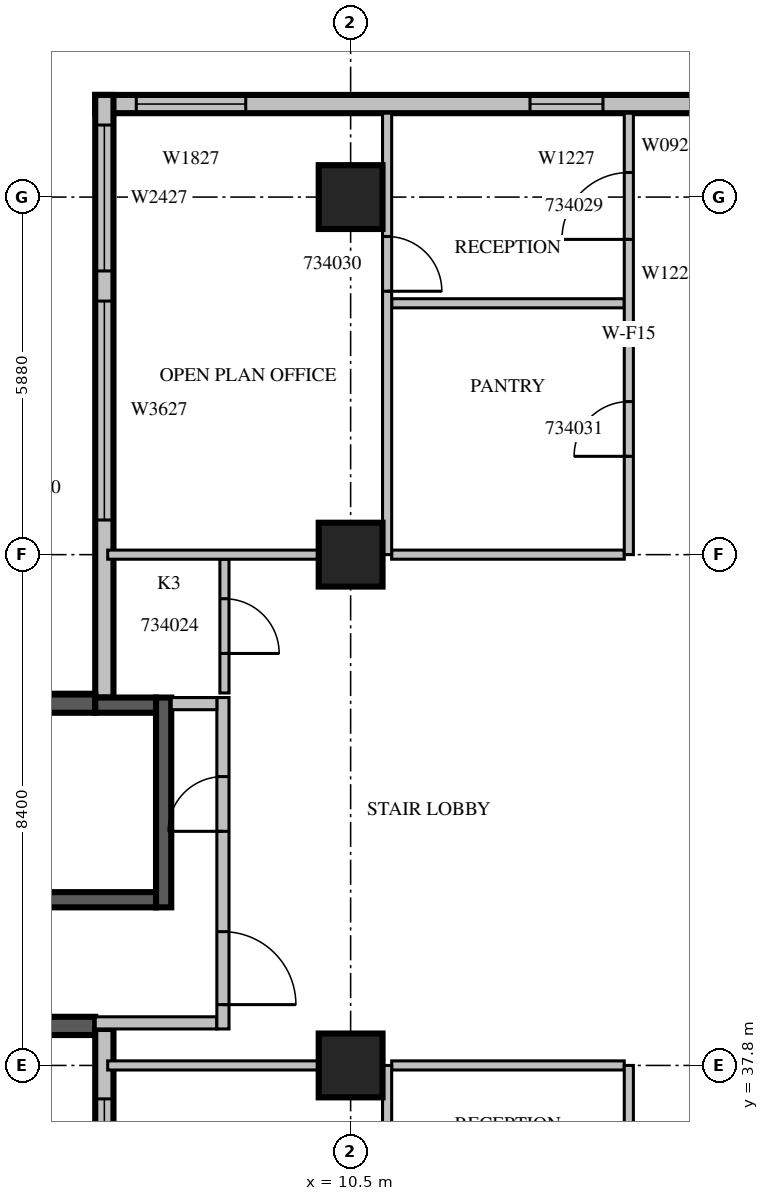
"""IFC4 building model, lengths in metres.
Left out: names, types, materials, properties, quantities, classifications, styles, units other than length and angle.
Written with IfcOpenShell. Run it as: python <this file> out.ifc"""

import sys

from ifc_helpers import new_model, si_unit, direction, frame, frame_2d, origin, origin_2d, place, context, subcontext, project, spatial, rectangle, extrude, source, transform, mapped, element, fill, save


model = new_model("IFC4")
c1 = context("Model", 3, precision=1e-05, world=origin(), true_north=direction((0.0, 1.0)))
c2 = subcontext(c1, "Body", "Model", "MODEL_VIEW")
j1 = project(units=[si_unit("LENGTHUNIT", "METRE"), si_unit("PLANEANGLEUNIT", "RADIAN")], contexts=[c1])
p1 = place(None, origin())
s1 = spatial("IfcSite", under=j1, at=p1, CompositionType="ELEMENT")
p2 = place(p1, origin())
s2 = spatial("IfcBuilding", under=s1, at=p2, CompositionType="ELEMENT")
p3 = place(p2, frame((0.0, 0.0, 153.9)))
s3 = spatial("IfcBuildingStorey", under=s2, at=p3, CompositionType="ELEMENT", Elevation=153.9)
m1 = source(origin(), c2, "Body", "SweptSolid", [
    extrude(rectangle(XDim=1.05, YDim=1.05, at=origin_2d()), origin(), (0.0, 0.0, 1.0), 4.2),
])
for number, where, z_axis, x_axis in (
    (1, (10.5, 37.8, 0.0), (0.0, 0.0, 1.0), (1.0, 0.0, 0.0)),
    (2, (10.5, 46.2, 0.0), (0.0, 0.0, 1.0), (1.0, 0.0, 0.0)),
    (3, (10.5, 52.08, 0.0), (0.0, 0.0, 1.0), (1.0, 0.0, 0.0)),
):
    element("IfcColumn", number, at=place(p3, frame(where, z_axis=z_axis, x_axis=x_axis)), inside=s3, PredefinedType="COLUMN", context=c2, shape_type="MappedRepresentation", body=[
        mapped(m1, transform((0.0, 0.0, 0.0), scale=1.0)),
    ])
m2 = source(origin(), c2, "Body", "SweptSolid", [
    extrude(rectangle(XDim=10.5, YDim=0.3, at=frame_2d((5.25, 0.0))), origin(), (0.0, 0.0, 1.0), 3.8),
])
p4 = place(p3, frame((16.8, 53.61, 0.0), z_axis=(0.0, 0.0, 1.0), x_axis=(-1.0, 0.0, 0.0)))
e4 = element("IfcWall", 4, at=p4, inside=s3, PredefinedType="STANDARD", context=c2, shape_type="MappedRepresentation", body=[
    mapped(m2, transform((0.0, 0.0, 0.0), scale=1.0)),
])
m3 = source(origin(), c2, "Body", "SweptSolid", [
    extrude(rectangle(XDim=1.2, YDim=2.7, at=frame_2d((0.6, 1.35))), frame((0.0, 0.16, 0.0), z_axis=(0.0, -1.0, 0.0), x_axis=(1.0, 0.0, 0.0)), (0.0, 0.0, 1.0), 0.32),
])
p5 = place(p4, frame((2.15, 0.0, 0.6)))
e5 = element("IfcOpeningElement", 5, at=p5, cuts=e4, PredefinedType="OPENING", context=c2, shape_type="MappedRepresentation", body=[
    mapped(m3, transform((0.0, 0.0, 0.0), scale=1.0)),
])
m4 = source(origin(), c2, "Body", "SweptSolid", [
    extrude(rectangle(XDim=1.8, YDim=2.7, at=frame_2d((0.9, 1.35))), frame((0.0, 0.16, 0.0), z_axis=(0.0, -1.0, 0.0), x_axis=(1.0, 0.0, 0.0)), (0.0, 0.0, 1.0), 0.32),
])
p6 = place(p4, frame((8.025, 0.0, 0.6)))
e6 = element("IfcOpeningElement", 6, at=p6, cuts=e4, PredefinedType="OPENING", context=c2, shape_type="MappedRepresentation", body=[
    mapped(m4, transform((0.0, 0.0, 0.0), scale=1.0)),
])
m5 = source(origin(), c2, "Body", "SweptSolid", [
    extrude(rectangle(XDim=9.91, YDim=0.3, at=frame_2d((4.955, 0.0))), origin(), (0.0, 0.0, 1.0), 3.8),
])
p7 = place(p3, frame((6.45, 53.76, 0.0), z_axis=(0.0, 0.0, 1.0), x_axis=(0.0, -1.0, 0.0)))
e7 = element("IfcWall", 7, at=p7, inside=s3, PredefinedType="STANDARD", context=c2, shape_type="MappedRepresentation", body=[
    mapped(m5, transform((0.0, 0.0, 0.0), scale=1.0)),
])
m6 = source(origin(), c2, "Body", "SweptSolid", [
    extrude(rectangle(XDim=3.6, YDim=2.7, at=frame_2d((1.8, 1.35))), frame((0.0, 0.16, 0.0), z_axis=(0.0, -1.0, 0.0), x_axis=(1.0, 0.0, 0.0)), (0.0, 0.0, 1.0), 0.32),
])
p8 = place(p7, frame((3.39, 0.0, 0.6)))
e8 = element("IfcOpeningElement", 8, at=p8, cuts=e7, PredefinedType="OPENING", context=c2, shape_type="MappedRepresentation", body=[
    mapped(m6, transform((0.0, 0.0, 0.0), scale=1.0)),
])
m7 = source(origin(), c2, "Body", "SweptSolid", [
    extrude(rectangle(XDim=2.4, YDim=2.7, at=frame_2d((1.2, 1.35))), frame((0.0, 0.16, 0.0), z_axis=(0.0, -1.0, 0.0), x_axis=(1.0, 0.0, 0.0)), (0.0, 0.0, 1.0), 0.32),
])
p9 = place(p7, frame((0.495, 0.0, 0.6)))
e9 = element("IfcOpeningElement", 9, at=p9, cuts=e7, PredefinedType="OPENING", context=c2, shape_type="MappedRepresentation", body=[
    mapped(m7, transform((0.0, 0.0, 0.0), scale=1.0)),
])
m8 = source(origin(), c2, "Body", "SweptSolid", [
    extrude(rectangle(XDim=6.1, YDim=0.3, at=frame_2d((3.05, 0.0))), origin(), (0.0, 0.0, 1.0), 3.8),
])
for number, where, z_axis, x_axis in (
    (10, (6.3, 43.75, 0.0), (0.0, 0.0, 1.0), (-1.0, 0.0, 0.0)),
    (11, (0.2, 38.45, 0.0), (0.0, 0.0, 1.0), (1.0, 0.0, 0.0)),
):
    element("IfcWall", number, at=place(p3, frame(where, z_axis=z_axis, x_axis=x_axis)), inside=s3, PredefinedType="SOLIDWALL", context=c2, shape_type="MappedRepresentation", body=[
        mapped(m8, transform((0.0, 0.0, 0.0), scale=1.0)),
    ])
m9 = source(origin(), c2, "Body", "SweptSolid", [
    extrude(rectangle(XDim=16.4, YDim=0.3, at=frame_2d((8.2, 0.0))), origin(), (0.0, 0.0, 1.0), 3.8),
])
p10 = place(p3, frame((6.45, 38.4, 0.0), z_axis=(0.0, 0.0, 1.0), x_axis=(0.0, -1.0, 0.0)))
e12 = element("IfcWall", 12, at=p10, inside=s3, PredefinedType="STANDARD", context=c2, shape_type="MappedRepresentation", body=[
    mapped(m9, transform((0.0, 0.0, 0.0), scale=1.0)),
])
p11 = place(p10, frame((1.15, 0.0, 0.6)))
e13 = element("IfcOpeningElement", 13, at=p11, cuts=e12, PredefinedType="OPENING", context=c2, shape_type="MappedRepresentation", body=[
    mapped(m4, transform((0.0, 0.0, 0.0), scale=1.0)),
])
p12 = place(p10, frame((4.75, 0.0, 0.6)))
e14 = element("IfcOpeningElement", 14, at=p12, cuts=e12, PredefinedType="OPENING", context=c2, shape_type="MappedRepresentation", body=[
    mapped(m7, transform((0.0, 0.0, 0.0), scale=1.0)),
])
p13 = place(p10, frame((12.912, 0.0, 0.6)))
e15 = element("IfcOpeningElement", 15, at=p13, cuts=e12, PredefinedType="OPENING", context=c2, shape_type="MappedRepresentation", body=[
    mapped(m3, transform((0.0, 0.0, 0.0), scale=1.0)),
])
m10 = source(origin(), c2, "Body", "SweptSolid", [
    extrude(rectangle(XDim=1.0, YDim=2.1, at=frame_2d((0.5, 1.05))), frame((0.0, 0.16, 0.0), z_axis=(0.0, -1.0, 0.0), x_axis=(1.0, 0.0, 0.0)), (0.0, 0.0, 1.0), 0.32),
])
p14 = place(p10, frame((10.142, 0.0, 0.0)))
e16 = element("IfcOpeningElement", 16, at=p14, cuts=e12, PredefinedType="OPENING", context=c2, shape_type="MappedRepresentation", body=[
    mapped(m10, transform((0.0, 0.0, 0.0), scale=1.0)),
])
m11 = source(origin(), c2, "Body", "SweptSolid", [
    extrude(rectangle(XDim=7.0, YDim=0.25, at=frame_2d((3.5, 0.0))), origin(), (0.0, 0.0, 1.0), 3.8),
])
p15 = place(p3, frame((0.3, 40.525, 0.0), z_axis=(0.0, 0.0, 1.0), x_axis=(1.0, 0.0, 0.0)))
e17 = element("IfcWall", 17, at=p15, inside=s3, PredefinedType="SOLIDWALL", context=c2, shape_type="MappedRepresentation", body=[
    mapped(m11, transform((0.0, 0.0, 0.0), scale=1.0)),
])
m12 = source(origin(), c2, "Body", "SweptSolid", [
    extrude(rectangle(XDim=1.1, YDim=2.1, at=frame_2d((0.55, 1.05))), frame((0.0, 0.135, 0.0), z_axis=(0.0, -1.0, 0.0), x_axis=(1.0, 0.0, 0.0)), (0.0, 0.0, 1.0), 0.27),
])
p16 = place(p15, frame((0.55, 0.0, 0.0)))
e18 = element("IfcOpeningElement", 18, at=p16, cuts=e17, PredefinedType="OPENING", context=c2, shape_type="MappedRepresentation", body=[
    mapped(m12, transform((0.0, 0.0, 0.0), scale=1.0)),
])
m13 = source(origin(), c2, "Body", "SweptSolid", [
    extrude(rectangle(XDim=1.0, YDim=0.25, at=frame_2d((0.5, 0.0))), origin(), (0.0, 0.0, 1.0), 3.8),
])
p17 = place(p3, frame((6.3, 43.725, 0.0), z_axis=(0.0, 0.0, 1.0), x_axis=(1.0, 0.0, 0.0)))
e19 = element("IfcWall", 19, at=p17, inside=s3, PredefinedType="SOLIDWALL", context=c2, shape_type="MappedRepresentation", body=[
    mapped(m13, transform((0.0, 0.0, 0.0), scale=1.0)),
])
m14 = source(origin(), c2, "Body", "SweptSolid", [
    extrude(rectangle(XDim=3.45, YDim=0.25, at=frame_2d((1.725, 0.0))), origin(), (0.0, 0.0, 1.0), 3.8),
])
p18 = place(p3, frame((7.425, 40.4, 0.0), z_axis=(0.0, 0.0, 1.0), x_axis=(0.0, 1.0, 0.0)))
e20 = element("IfcWall", 20, at=p18, inside=s3, PredefinedType="SOLIDWALL", context=c2, shape_type="MappedRepresentation", body=[
    mapped(m14, transform((0.0, 0.0, 0.0), scale=1.0)),
])
m15 = source(origin(), c2, "Body", "SweptSolid", [
    extrude(rectangle(XDim=2.0, YDim=0.2, at=frame_2d((1.0, 0.0))), origin(), (0.0, 0.0, 1.0), 3.8),
])
p19 = place(p3, frame((6.3, 38.5, 0.0), z_axis=(0.0, 0.0, 1.0), x_axis=(1.0, 0.0, 0.0)))
e21 = element("IfcWall", 21, at=p19, inside=s3, PredefinedType="PARTITIONING", context=c2, shape_type="MappedRepresentation", body=[
    mapped(m15, transform((0.0, 0.0, 0.0), scale=1.0)),
])
m16 = source(origin(), c2, "Body", "SweptSolid", [
    extrude(rectangle(XDim=5.45, YDim=0.2, at=frame_2d((2.725, 0.0))), origin(), (0.0, 0.0, 1.0), 3.8),
])
p20 = place(p3, frame((8.4, 38.4, 0.0), z_axis=(0.0, 0.0, 1.0), x_axis=(0.0, 1.0, 0.0)))
e22 = element("IfcWall", 22, at=p20, inside=s3, PredefinedType="PARTITIONING", context=c2, shape_type="MappedRepresentation", body=[
    mapped(m16, transform((0.0, 0.0, 0.0), scale=1.0)),
])
m17 = source(origin(), c2, "Body", "SweptSolid", [
    extrude(rectangle(XDim=1.2, YDim=2.1, at=frame_2d((0.6, 1.05))), frame((0.0, 0.11, 0.0), z_axis=(0.0, -1.0, 0.0), x_axis=(1.0, 0.0, 0.0)), (0.0, 0.0, 1.0), 0.22),
])
p21 = place(p20, frame((0.4, 0.0, 0.0)))
e23 = element("IfcOpeningElement", 23, at=p21, cuts=e22, PredefinedType="OPENING", context=c2, shape_type="MappedRepresentation", body=[
    mapped(m17, transform((0.0, 0.0, 0.0), scale=1.0)),
])
m18 = source(origin(), c2, "Body", "SweptSolid", [
    extrude(rectangle(XDim=0.9, YDim=2.1, at=frame_2d((0.45, 1.05))), frame((0.0, 0.11, 0.0), z_axis=(0.0, -1.0, 0.0), x_axis=(1.0, 0.0, 0.0)), (0.0, 0.0, 1.0), 0.22),
])
p22 = place(p20, frame((3.25, 0.0, 0.0)))
e24 = element("IfcOpeningElement", 24, at=p22, cuts=e22, PredefinedType="OPENING", context=c2, shape_type="MappedRepresentation", body=[
    mapped(m18, transform((0.0, 0.0, 0.0), scale=1.0)),
])
m19 = source(origin(), c2, "Body", "SweptSolid", [
    extrude(rectangle(XDim=0.75, YDim=0.2, at=frame_2d((0.375, 0.0))), origin(), (0.0, 0.0, 1.0), 3.8),
])
p23 = place(p3, frame((7.55, 43.75, 0.0), z_axis=(0.0, 0.0, 1.0), x_axis=(1.0, 0.0, 0.0)))
e25 = element("IfcWall", 25, at=p23, inside=s3, PredefinedType="PARTITIONING", context=c2, shape_type="MappedRepresentation", body=[
    mapped(m19, transform((0.0, 0.0, 0.0), scale=1.0)),
])
m20 = source(origin(), c2, "Body", "SweptSolid", [
    extrude(rectangle(XDim=2.2, YDim=0.15, at=frame_2d((1.1, 0.0))), origin(), (0.0, 0.0, 1.0), 3.8),
])
p24 = place(p3, frame((8.425, 43.925, 0.0), z_axis=(0.0, 0.0, 1.0), x_axis=(0.0, 1.0, 0.0)))
e26 = element("IfcWall", 26, at=p24, inside=s3, PredefinedType="PARTITIONING", context=c2, shape_type="MappedRepresentation", body=[
    mapped(m20, transform((0.0, 0.0, 0.0), scale=1.0)),
])
m21 = source(origin(), c2, "Body", "SweptSolid", [
    extrude(rectangle(XDim=0.9, YDim=2.1, at=frame_2d((0.45, 1.05))), frame((0.0, 0.085, 0.0), z_axis=(0.0, -1.0, 0.0), x_axis=(1.0, 0.0, 0.0)), (0.0, 0.0, 1.0), 0.17),
])
p25 = place(p24, frame((0.65, 0.0, 0.0)))
e27 = element("IfcOpeningElement", 27, at=p25, cuts=e26, PredefinedType="OPENING", context=c2, shape_type="MappedRepresentation", body=[
    mapped(m21, transform((0.0, 0.0, 0.0), scale=1.0)),
])
m22 = source(origin(), c2, "Body", "SweptSolid", [
    extrude(rectangle(XDim=3.471, YDim=0.15, at=frame_2d((1.736, 0.0))), origin(), (0.0, 0.0, 1.0), 3.8),
])
p26 = place(p3, frame((9.976, 37.8, 0.0), z_axis=(0.0, 0.0, 1.0), x_axis=(-1.0, 0.0, 0.0)))
e28 = element("IfcWall", 28, at=p26, inside=s3, PredefinedType="PARTITIONING", context=c2, shape_type="MappedRepresentation", body=[
    mapped(m22, transform((0.0, 0.0, 0.0), scale=1.0)),
])
m23 = source(origin(), c2, "Body", "SweptSolid", [
    extrude(rectangle(XDim=3.825, YDim=0.15, at=frame_2d((1.913, 0.0))), origin(), (0.0, 0.0, 1.0), 3.8),
])
p27 = place(p3, frame((15.0, 37.8, 0.0), z_axis=(0.0, 0.0, 1.0), x_axis=(-1.0, 0.0, 0.0)))
e29 = element("IfcWall", 29, at=p27, inside=s3, PredefinedType="PARTITIONING", context=c2, shape_type="MappedRepresentation", body=[
    mapped(m23, transform((0.0, 0.0, 0.0), scale=1.0)),
])
m24 = source(origin(), c2, "Body", "SweptSolid", [
    extrude(rectangle(XDim=8.4, YDim=0.15, at=frame_2d((4.2, 0.0))), origin(), (0.0, 0.0, 1.0), 3.8),
])
p28 = place(p3, frame((11.1, 29.4, 0.0), z_axis=(0.0, 0.0, 1.0), x_axis=(0.0, 1.0, 0.0)))
e30 = element("IfcWall", 30, at=p28, inside=s3, PredefinedType="PARTITIONING", context=c2, shape_type="MappedRepresentation", body=[
    mapped(m24, transform((0.0, 0.0, 0.0), scale=1.0)),
])
m25 = source(origin(), c2, "Body", "SweptSolid", [
    extrude(rectangle(XDim=1.1, YDim=2.1, at=frame_2d((0.55, 1.05))), frame((0.0, 0.085, 0.0), z_axis=(0.0, -1.0, 0.0), x_axis=(1.0, 0.0, 0.0)), (0.0, 0.0, 1.0), 0.17),
])
p29 = place(p28, frame((5.955, 0.0, 0.0)))
e31 = element("IfcOpeningElement", 31, at=p29, cuts=e30, PredefinedType="OPENING", context=c2, shape_type="MappedRepresentation", body=[
    mapped(m25, transform((0.0, 0.0, 0.0), scale=1.0)),
])
p30 = place(p3, frame((15.0, 50.334, 0.0), z_axis=(0.0, 0.0, 1.0), x_axis=(-1.0, 0.0, 0.0)))
e32 = element("IfcWall", 32, at=p30, inside=s3, PredefinedType="PARTITIONING", context=c2, shape_type="MappedRepresentation", body=[
    mapped(m23, transform((0.0, 0.0, 0.0), scale=1.0)),
])
p31 = place(p3, frame((9.976, 46.2, 0.0), z_axis=(0.0, 0.0, 1.0), x_axis=(-1.0, 0.0, 0.0)))
e33 = element("IfcWall", 33, at=p31, inside=s3, PredefinedType="PARTITIONING", context=c2, shape_type="MappedRepresentation", body=[
    mapped(m22, transform((0.0, 0.0, 0.0), scale=1.0)),
])
p32 = place(p3, frame((15.0, 46.2, 0.0), z_axis=(0.0, 0.0, 1.0), x_axis=(-1.0, 0.0, 0.0)))
e34 = element("IfcWall", 34, at=p32, inside=s3, PredefinedType="PARTITIONING", context=c2, shape_type="MappedRepresentation", body=[
    mapped(m23, transform((0.0, 0.0, 0.0), scale=1.0)),
])
m26 = source(origin(), c2, "Body", "SweptSolid", [
    extrude(rectangle(XDim=7.26, YDim=0.15, at=frame_2d((3.63, 0.0))), origin(), (0.0, 0.0, 1.0), 3.8),
])
p33 = place(p3, frame((11.1, 46.2, 0.0), z_axis=(0.0, 0.0, 1.0), x_axis=(0.0, 1.0, 0.0)))
e35 = element("IfcWall", 35, at=p33, inside=s3, PredefinedType="PARTITIONING", context=c2, shape_type="MappedRepresentation", body=[
    mapped(m26, transform((0.0, 0.0, 0.0), scale=1.0)),
])
p34 = place(p33, frame((4.332, 0.0, 0.0)))
e36 = element("IfcOpeningElement", 36, at=p34, cuts=e35, PredefinedType="OPENING", context=c2, shape_type="MappedRepresentation", body=[
    mapped(m21, transform((0.0, 0.0, 0.0), scale=1.0)),
])
p35 = place(p3, frame((15.075, 29.4, 0.0), z_axis=(0.0, 0.0, 1.0), x_axis=(0.0, 1.0, 0.0)))
e37 = element("IfcWall", 37, at=p35, inside=s3, PredefinedType="PARTITIONING", context=c2, shape_type="MappedRepresentation", body=[
    mapped(m24, transform((0.0, 0.0, 0.0), scale=1.0)),
])
p36 = place(p35, frame((6.18, 0.0, 0.0)))
e38 = element("IfcOpeningElement", 38, at=p36, cuts=e37, PredefinedType="OPENING", context=c2, shape_type="MappedRepresentation", body=[
    mapped(m25, transform((0.0, 0.0, 0.0), scale=1.0)),
])
p37 = place(p35, frame((0.756, 0.0, 0.0)))
e39 = element("IfcOpeningElement", 39, at=p37, cuts=e37, PredefinedType="OPENING", context=c2, shape_type="MappedRepresentation", body=[
    mapped(m21, transform((0.0, 0.0, 0.0), scale=1.0)),
])
p38 = place(p35, frame((3.286, 0.0, 0.0)))
e40 = element("IfcOpeningElement", 40, at=p38, cuts=e37, PredefinedType="OPENING", context=c2, shape_type="MappedRepresentation", body=[
    mapped(m21, transform((0.0, 0.0, 0.0), scale=1.0)),
])
p39 = place(p3, frame((15.075, 46.2, 0.0), z_axis=(0.0, 0.0, 1.0), x_axis=(0.0, 1.0, 0.0)))
e41 = element("IfcWall", 41, at=p39, inside=s3, PredefinedType="PARTITIONING", context=c2, shape_type="MappedRepresentation", body=[
    mapped(m26, transform((0.0, 0.0, 0.0), scale=1.0)),
])
p40 = place(p39, frame((5.184, 0.0, 0.0)))
e42 = element("IfcOpeningElement", 42, at=p40, cuts=e41, PredefinedType="OPENING", context=c2, shape_type="MappedRepresentation", body=[
    mapped(m25, transform((0.0, 0.0, 0.0), scale=1.0)),
])
p41 = place(p39, frame((1.617, 0.0, 0.0)))
e43 = element("IfcOpeningElement", 43, at=p41, cuts=e41, PredefinedType="OPENING", context=c2, shape_type="MappedRepresentation", body=[
    mapped(m21, transform((0.0, 0.0, 0.0), scale=1.0)),
])
m27 = source(origin(), c2, "Body", "SweptSolid", [
    extrude(rectangle(XDim=1.2, YDim=2.7, at=frame_2d((0.6, 1.35))), frame((0.0, 0.03, 0.0), z_axis=(0.0, -1.0, 0.0), x_axis=(1.0, 0.0, 0.0)), (0.0, 0.0, 1.0), 0.06),
])
p42 = place(p5, origin())
e44 = element("IfcWindow", 44, at=p42, inside=s3, PartitioningType="SINGLE_PANEL", PredefinedType="WINDOW", context=c2, shape_type="MappedRepresentation", body=[
    mapped(m27, transform((0.0, 0.0, 0.0), scale=1.0)),
])
fill(e5, e44)
m28 = source(origin(), c2, "Body", "SweptSolid", [
    extrude(rectangle(XDim=1.8, YDim=2.7, at=frame_2d((0.9, 1.35))), frame((0.0, 0.03, 0.0), z_axis=(0.0, -1.0, 0.0), x_axis=(1.0, 0.0, 0.0)), (0.0, 0.0, 1.0), 0.06),
])
p43 = place(p6, origin())
e45 = element("IfcWindow", 45, at=p43, inside=s3, PartitioningType="SINGLE_PANEL", PredefinedType="WINDOW", context=c2, shape_type="MappedRepresentation", body=[
    mapped(m28, transform((0.0, 0.0, 0.0), scale=1.0)),
])
fill(e6, e45)
m29 = source(origin(), c2, "Body", "SweptSolid", [
    extrude(rectangle(XDim=3.6, YDim=2.7, at=frame_2d((1.8, 1.35))), frame((0.0, 0.03, 0.0), z_axis=(0.0, -1.0, 0.0), x_axis=(1.0, 0.0, 0.0)), (0.0, 0.0, 1.0), 0.06),
])
p44 = place(p8, origin())
e46 = element("IfcWindow", 46, at=p44, inside=s3, PartitioningType="SINGLE_PANEL", PredefinedType="WINDOW", context=c2, shape_type="MappedRepresentation", body=[
    mapped(m29, transform((0.0, 0.0, 0.0), scale=1.0)),
])
fill(e8, e46)
m30 = source(origin(), c2, "Body", "SweptSolid", [
    extrude(rectangle(XDim=2.4, YDim=2.7, at=frame_2d((1.2, 1.35))), frame((0.0, 0.03, 0.0), z_axis=(0.0, -1.0, 0.0), x_axis=(1.0, 0.0, 0.0)), (0.0, 0.0, 1.0), 0.06),
])
p45 = place(p9, origin())
e47 = element("IfcWindow", 47, at=p45, inside=s3, PartitioningType="SINGLE_PANEL", PredefinedType="WINDOW", context=c2, shape_type="MappedRepresentation", body=[
    mapped(m30, transform((0.0, 0.0, 0.0), scale=1.0)),
])
fill(e9, e47)
p46 = place(p11, origin())
e48 = element("IfcWindow", 48, at=p46, inside=s3, PartitioningType="SINGLE_PANEL", PredefinedType="WINDOW", context=c2, shape_type="MappedRepresentation", body=[
    mapped(m28, transform((0.0, 0.0, 0.0), scale=1.0)),
])
fill(e13, e48)
m31 = source(origin(), c2, "Body", "SweptSolid", [
    extrude(rectangle(XDim=1.2, YDim=2.1, at=frame_2d((0.6, 1.05))), frame((0.0, 0.025, 0.0), z_axis=(0.0, -1.0, 0.0), x_axis=(1.0, 0.0, 0.0)), (0.0, 0.0, 1.0), 0.05),
])
p47 = place(p21, origin())
e49 = element("IfcDoor", 49, at=p47, inside=s3, OperationType="SINGLE_SWING_RIGHT", PredefinedType="DOOR", context=c2, shape_type="MappedRepresentation", body=[
    mapped(m31, transform((0.0, 0.0, 0.0), scale=1.0)),
])
fill(e23, e49)
m32 = source(origin(), c2, "Body", "SweptSolid", [
    extrude(rectangle(XDim=0.9, YDim=2.1, at=frame_2d((0.45, 1.05))), frame((0.0, 0.025, 0.0), z_axis=(0.0, -1.0, 0.0), x_axis=(1.0, 0.0, 0.0)), (0.0, 0.0, 1.0), 0.05),
])
p48 = place(p22, origin())
e50 = element("IfcDoor", 50, at=p48, inside=s3, OperationType="SINGLE_SWING_LEFT", PredefinedType="DOOR", context=c2, shape_type="MappedRepresentation", body=[
    mapped(m32, transform((0.0, 0.0, 0.0), scale=1.0)),
])
fill(e24, e50)
p49 = place(p25, origin())
e51 = element("IfcDoor", 51, at=p49, inside=s3, OperationType="SINGLE_SWING_RIGHT", PredefinedType="DOOR", context=c2, shape_type="MappedRepresentation", body=[
    mapped(m32, transform((0.0, 0.0, 0.0), scale=1.0)),
])
fill(e27, e51)
m33 = source(origin(), c2, "Body", "SweptSolid", [
    extrude(rectangle(XDim=1.1, YDim=2.1, at=frame_2d((0.55, 1.05))), frame((0.0, 0.025, 0.0), z_axis=(0.0, -1.0, 0.0), x_axis=(1.0, 0.0, 0.0)), (0.0, 0.0, 1.0), 0.05),
])
p50 = place(p40, origin())
e52 = element("IfcDoor", 52, at=p50, inside=s3, OperationType="SINGLE_SWING_LEFT", PredefinedType="DOOR", context=c2, shape_type="MappedRepresentation", body=[
    mapped(m33, transform((0.0, 0.0, 0.0), scale=1.0)),
])
fill(e42, e52)
p51 = place(p34, origin())
e53 = element("IfcDoor", 53, at=p51, inside=s3, OperationType="SINGLE_SWING_RIGHT", PredefinedType="DOOR", context=c2, shape_type="MappedRepresentation", body=[
    mapped(m32, transform((0.0, 0.0, 0.0), scale=1.0)),
])
fill(e36, e53)
p52 = place(p41, origin())
e54 = element("IfcDoor", 54, at=p52, inside=s3, OperationType="SINGLE_SWING_LEFT", PredefinedType="DOOR", context=c2, shape_type="MappedRepresentation", body=[
    mapped(m32, transform((0.0, 0.0, 0.0), scale=1.0)),
])
fill(e43, e54)
save(model, sys.argv[1])
